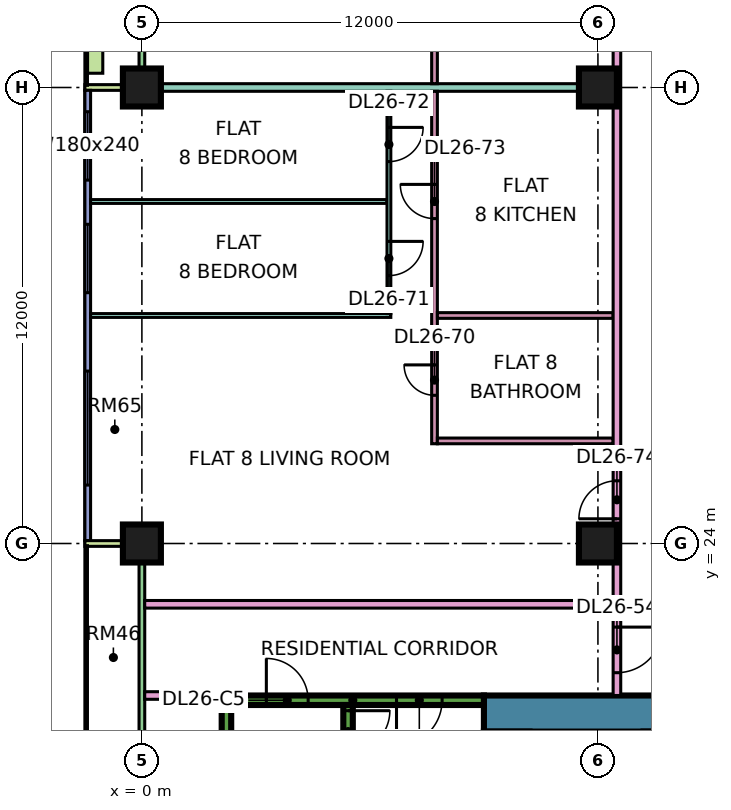
"""IFC4 building model, lengths in metres.
Left out: names, types, materials, properties, quantities, classifications, styles, units other than length and angle.
Written with IfcOpenShell. Run it as: python <this file> out.ifc"""

import sys

from ifc_helpers import new_model, si_unit, direction, frame, frame_2d, origin, origin_2d, place, context, subcontext, project, spatial, rectangle, extrude, element, fill, save


model = new_model("IFC4")
c1 = context("Model", 3, precision=1e-05, world=origin(), true_north=direction((0.0, 1.0)))
c2 = subcontext(c1, "Body", "Model", "MODEL_VIEW")
j1 = project(units=[si_unit("LENGTHUNIT", "METRE"), si_unit("PLANEANGLEUNIT", "RADIAN")], contexts=[c1])
p1 = place(None, origin())
s1 = spatial("IfcSite", under=j1, at=p1, CompositionType="ELEMENT")
p2 = place(p1, origin())
s2 = spatial("IfcBuilding", under=s1, at=p2, CompositionType="ELEMENT")
p3 = place(p2, frame((0.0, 0.0, 114.4)))
s3 = spatial("IfcBuildingStorey", under=s2, at=p3, CompositionType="ELEMENT", Elevation=114.4)
p4 = place(p3, frame((0.0, 24.0, 0.0), z_axis=(0.0, 0.0, 1.0), x_axis=(1.0, 0.0, 0.0)))
e1 = element("IfcColumn", 1, at=p4, inside=s3, PredefinedType="COLUMN", context=c2, shape_type="SweptSolid", body=[
    extrude(rectangle(XDim=1.0, YDim=1.0, at=origin_2d()), origin(), (0.0, 0.0, 1.0), 3.75),
])
p5 = place(p3, frame((0.0, 36.0, 0.0), z_axis=(0.0, 0.0, 1.0), x_axis=(1.0, 0.0, 0.0)))
e2 = element("IfcColumn", 2, at=p5, inside=s3, PredefinedType="COLUMN", context=c2, shape_type="SweptSolid", body=[
    extrude(rectangle(XDim=1.0, YDim=1.0, at=origin_2d()), origin(), (0.0, 0.0, 1.0), 3.75),
])
for number, where, z_axis, x_axis in (
    (3, (12.0, 24.0, 0.0), (0.0, 0.0, 1.0), (1.0, 0.0, 0.0)),
    (4, (12.0, 36.0, 0.0), (0.0, 0.0, 1.0), (1.0, 0.0, 0.0)),
):
    element("IfcColumn", number, at=place(p3, frame(where, z_axis=z_axis, x_axis=x_axis)), inside=s3, PredefinedType="COLUMN", context=c2, shape_type="SweptSolid", body=[
        extrude(rectangle(XDim=1.0, YDim=1.0, at=origin_2d()), origin(), (0.0, 0.0, 1.0), 3.75),
    ])
p6 = place(p3, frame((9.0, 19.525, 0.0), z_axis=(0.0, 0.0, 1.0), x_axis=(1.0, 0.0, 0.0)))
e5 = element("IfcWall", 5, at=p6, inside=s3, PredefinedType="SHEAR", context=c2, shape_type="SweptSolid", body=[
    extrude(rectangle(XDim=25.0, YDim=0.95, at=frame_2d((12.5, 0.0))), origin(), (0.0, 0.0, 1.0), 3.75),
])
p7 = place(p6, frame((19.1, 0.0, 0.0)))
e6 = element("IfcOpeningElement", 6, at=p7, cuts=e5, PredefinedType="OPENING", context=c2, shape_type="SweptSolid", body=[
    extrude(rectangle(XDim=1.8, YDim=2.4, at=frame_2d((0.9, 1.2))), frame((0.0, 0.485, 0.0), z_axis=(0.0, -1.0, 0.0), x_axis=(1.0, 0.0, 0.0)), (0.0, 0.0, 1.0), 0.97),
])
p8 = place(p3, frame((2.1, 19.875, 0.0), z_axis=(0.0, 0.0, 1.0), x_axis=(1.0, 0.0, 0.0)))
e7 = element("IfcWall", 7, at=p8, inside=s3, PredefinedType="SHEAR", context=c2, shape_type="SweptSolid", body=[
    extrude(rectangle(XDim=6.9, YDim=0.25, at=frame_2d((3.45, 0.0))), origin(), (0.0, 0.0, 1.0), 3.75),
])
p9 = place(p8, frame((1.175, 0.0, 0.0)))
e8 = element("IfcOpeningElement", 8, at=p9, cuts=e7, PredefinedType="OPENING", context=c2, shape_type="SweptSolid", body=[
    extrude(rectangle(XDim=1.1, YDim=2.2, at=frame_2d((0.55, 1.1))), frame((0.0, 0.135, 0.0), z_axis=(0.0, -1.0, 0.0), x_axis=(1.0, 0.0, 0.0)), (0.0, 0.0, 1.0), 0.27),
])
p10 = place(p8, frame((4.6, 0.0, 0.0)))
e9 = element("IfcOpeningElement", 9, at=p10, cuts=e7, PredefinedType="OPENING", context=c2, shape_type="SweptSolid", body=[
    extrude(rectangle(XDim=1.2, YDim=2.2, at=frame_2d((0.6, 1.1))), frame((0.0, 0.135, 0.0), z_axis=(0.0, -1.0, 0.0), x_axis=(1.0, 0.0, 0.0)), (0.0, 0.0, 1.0), 0.27),
])
p11 = place(p3, frame((2.225, 13.25, 0.0), z_axis=(0.0, 0.0, 1.0), x_axis=(0.0, 1.0, 0.0)))
e10 = element("IfcWall", 10, at=p11, inside=s3, PredefinedType="SHEAR", context=c2, shape_type="SweptSolid", body=[
    extrude(rectangle(XDim=6.5, YDim=0.25, at=frame_2d((3.25, 0.0))), origin(), (0.0, 0.0, 1.0), 3.75),
])
p12 = place(p3, frame((5.425, 13.25, 0.0), z_axis=(0.0, 0.0, 1.0), x_axis=(0.0, 1.0, 0.0)))
e11 = element("IfcWall", 11, at=p12, inside=s3, PredefinedType="SHEAR", context=c2, shape_type="SweptSolid", body=[
    extrude(rectangle(XDim=6.5, YDim=0.25, at=frame_2d((3.25, 0.0))), origin(), (0.0, 0.0, 1.0), 3.75),
])
p13 = place(p12, frame((5.25, 0.0, 0.0)))
e12 = element("IfcOpeningElement", 12, at=p13, cuts=e11, PredefinedType="OPENING", context=c2, shape_type="SweptSolid", body=[
    extrude(rectangle(XDim=1.1, YDim=2.2, at=frame_2d((0.55, 1.1))), frame((0.0, 0.135, 0.0), z_axis=(0.0, -1.0, 0.0), x_axis=(1.0, 0.0, 0.0)), (0.0, 0.0, 1.0), 0.27),
])
p14 = place(p3, frame((0.0, 47.925, 0.0), z_axis=(0.0, 0.0, 1.0), x_axis=(0.0, -1.0, 0.0)))
e13 = element("IfcWall", 13, at=p14, inside=s3, PredefinedType="SOLIDWALL", context=c2, shape_type="SweptSolid", body=[
    extrude(rectangle(XDim=11.85, YDim=0.15, at=frame_2d((5.925, 0.0))), origin(), (0.0, 0.0, 1.0), 3.35),
])
p15 = place(p14, frame((0.562, 0.0, 0.45)))
e14 = element("IfcOpeningElement", 14, at=p15, cuts=e13, PredefinedType="OPENING", context=c2, shape_type="SweptSolid", body=[
    extrude(rectangle(XDim=1.2, YDim=2.4, at=frame_2d((0.6, 1.2))), frame((0.0, 0.085, 0.0), z_axis=(0.0, -1.0, 0.0), x_axis=(1.0, 0.0, 0.0)), (0.0, 0.0, 1.0), 0.17),
])
p16 = place(p14, frame((4.125, 0.0, 0.0)))
e15 = element("IfcOpeningElement", 15, at=p16, cuts=e13, PredefinedType="OPENING", context=c2, shape_type="SweptSolid", body=[
    extrude(rectangle(XDim=1.2, YDim=2.4, at=frame_2d((0.6, 1.2))), frame((0.0, 0.085, 0.0), z_axis=(0.0, -1.0, 0.0), x_axis=(1.0, 0.0, 0.0)), (0.0, 0.0, 1.0), 0.17),
])
p17 = place(p14, frame((7.125, 0.0, 0.45)))
e16 = element("IfcOpeningElement", 16, at=p17, cuts=e13, PredefinedType="OPENING", context=c2, shape_type="SweptSolid", body=[
    extrude(rectangle(XDim=3.0, YDim=2.4, at=frame_2d((1.5, 1.2))), frame((0.0, 0.085, 0.0), z_axis=(0.0, -1.0, 0.0), x_axis=(1.0, 0.0, 0.0)), (0.0, 0.0, 1.0), 0.17),
])
p18 = place(p3, frame((-1.5, 36.0, 0.0), z_axis=(0.0, 0.0, 1.0), x_axis=(1.0, 0.0, 0.0)))
e17 = element("IfcWall", 17, at=p18, inside=s3, PredefinedType="SOLIDWALL", context=c2, shape_type="SweptSolid", body=[
    extrude(rectangle(XDim=1.5, YDim=0.15, at=frame_2d((0.75, 0.0))), origin(), (0.0, 0.0, 1.0), 3.35),
])
p19 = place(p3, frame((-1.425, 35.925, 0.0), z_axis=(0.0, 0.0, 1.0), x_axis=(0.0, -1.0, 0.0)))
e18 = element("IfcWall", 18, at=p19, inside=s3, PredefinedType="SOLIDWALL", context=c2, shape_type="SweptSolid", body=[
    extrude(rectangle(XDim=11.85, YDim=0.15, at=frame_2d((5.925, 0.0))), origin(), (0.0, 0.0, 1.0), 3.35),
])
p20 = place(p19, frame((0.562, 0.0, 0.45)))
e19 = element("IfcOpeningElement", 19, at=p20, cuts=e18, PredefinedType="OPENING", context=c2, shape_type="SweptSolid", body=[
    extrude(rectangle(XDim=1.8, YDim=2.4, at=frame_2d((0.9, 1.2))), frame((0.0, 0.085, 0.0), z_axis=(0.0, -1.0, 0.0), x_axis=(1.0, 0.0, 0.0)), (0.0, 0.0, 1.0), 0.17),
])
p21 = place(p19, frame((3.525, 0.0, 0.45)))
e20 = element("IfcOpeningElement", 20, at=p21, cuts=e18, PredefinedType="OPENING", context=c2, shape_type="SweptSolid", body=[
    extrude(rectangle(XDim=1.8, YDim=2.4, at=frame_2d((0.9, 1.2))), frame((0.0, 0.085, 0.0), z_axis=(0.0, -1.0, 0.0), x_axis=(1.0, 0.0, 0.0)), (0.0, 0.0, 1.0), 0.17),
])
p22 = place(p19, frame((7.387, 0.0, 0.45)))
e21 = element("IfcOpeningElement", 21, at=p22, cuts=e18, PredefinedType="OPENING", context=c2, shape_type="SweptSolid", body=[
    extrude(rectangle(XDim=3.0, YDim=2.4, at=frame_2d((1.5, 1.2))), frame((0.0, 0.085, 0.0), z_axis=(0.0, -1.0, 0.0), x_axis=(1.0, 0.0, 0.0)), (0.0, 0.0, 1.0), 0.17),
])
p23 = place(p3, frame((0.0, 23.925, 0.0), z_axis=(0.0, 0.0, 1.0), x_axis=(0.0, -1.0, 0.0)))
e22 = element("IfcWall", 22, at=p23, inside=s3, PredefinedType="SOLIDWALL", context=c2, shape_type="SweptSolid", body=[
    extrude(rectangle(XDim=11.35, YDim=0.15, at=frame_2d((5.675, 0.0))), origin(), (0.0, 0.0, 1.0), 3.35),
])
p24 = place(p23, frame((6.738, 0.0, 0.0)))
e23 = element("IfcOpeningElement", 23, at=p24, cuts=e22, PredefinedType="OPENING", context=c2, shape_type="SweptSolid", body=[
    extrude(rectangle(XDim=1.8, YDim=2.4, at=frame_2d((0.9, 1.2))), frame((0.0, 0.085, 0.0), z_axis=(0.0, -1.0, 0.0), x_axis=(1.0, 0.0, 0.0)), (0.0, 0.0, 1.0), 0.17),
])
p25 = place(p3, frame((-1.5, 24.0, 0.0), z_axis=(0.0, 0.0, 1.0), x_axis=(1.0, 0.0, 0.0)))
e24 = element("IfcWall", 24, at=p25, inside=s3, PredefinedType="SOLIDWALL", context=c2, shape_type="SweptSolid", body=[
    extrude(rectangle(XDim=1.5, YDim=0.15, at=frame_2d((0.75, 0.0))), origin(), (0.0, 0.0, 1.0), 3.35),
])
p26 = place(p3, frame((-1.229, 47.625, 0.0), z_axis=(0.0, 0.0, 1.0), x_axis=(0.0, -1.0, 0.0)))
e25 = element("IfcWall", 25, at=p26, inside=s3, PredefinedType="SOLIDWALL", context=c2, shape_type="SweptSolid", body=[
    extrude(rectangle(XDim=11.25, YDim=0.4, at=frame_2d((5.625, 0.0))), origin(), (0.0, 0.0, 1.0), 0.7),
])
p27 = place(p3, frame((-1.351, 33.0, 0.0), z_axis=(0.0, 0.0, 1.0), x_axis=(1.0, 0.0, 0.0)))
e26 = element("IfcWall", 26, at=p27, inside=s3, PredefinedType="PARTITIONING", context=c2, shape_type="SweptSolid", body=[
    extrude(rectangle(XDim=7.801, YDim=0.1, at=frame_2d((3.9, 0.0))), origin(), (0.0, 0.0, 1.0), 3.35),
])
p28 = place(p3, frame((-1.35, 30.0, 0.0), z_axis=(0.0, 0.0, 1.0), x_axis=(1.0, 0.0, 0.0)))
e27 = element("IfcWall", 27, at=p28, inside=s3, PredefinedType="PARTITIONING", context=c2, shape_type="SweptSolid", body=[
    extrude(rectangle(XDim=7.9, YDim=0.1, at=frame_2d((3.95, 0.0))), origin(), (0.0, 0.0, 1.0), 3.35),
])
e28 = element("IfcWall", 28, at=p5, inside=s3, PredefinedType="PARTITIONING", context=c2, shape_type="SweptSolid", body=[
    extrude(rectangle(XDim=12.4, YDim=0.2, at=frame_2d((6.2, 0.0))), origin(), (0.0, 0.0, 1.0), 3.35),
])
p29 = place(p3, frame((0.074, 20.0, 0.0), z_axis=(0.0, 0.0, 1.0), x_axis=(1.0, 0.0, 0.0)))
e29 = element("IfcWall", 29, at=p29, inside=s3, PredefinedType="PARTITIONING", context=c2, shape_type="SweptSolid", body=[
    extrude(rectangle(XDim=2.026, YDim=0.2, at=frame_2d((1.013, 0.0))), origin(), (0.0, 0.0, 1.0), 3.35),
])
p30 = place(p3, frame((0.074, 22.4, 0.0), z_axis=(0.0, 0.0, 1.0), x_axis=(1.0, 0.0, 0.0)))
e30 = element("IfcWall", 30, at=p30, inside=s3, PredefinedType="PARTITIONING", context=c2, shape_type="SweptSolid", body=[
    extrude(rectangle(XDim=12.326, YDim=0.2, at=frame_2d((6.163, 0.0))), origin(), (0.0, 0.0, 1.0), 3.35),
])
p31 = place(p3, frame((6.5, 30.05, 0.0), z_axis=(0.0, 0.0, 1.0), x_axis=(0.0, 1.0, 0.0)))
e31 = element("IfcWall", 31, at=p31, inside=s3, PredefinedType="PARTITIONING", context=c2, shape_type="SweptSolid", body=[
    extrude(rectangle(XDim=5.85, YDim=0.1, at=frame_2d((2.925, 0.0))), origin(), (0.0, 0.0, 1.0), 3.35),
])
p32 = place(p31, frame((1.0, 0.0, 0.0)))
e32 = element("IfcOpeningElement", 32, at=p32, cuts=e31, PredefinedType="OPENING", context=c2, shape_type="SweptSolid", body=[
    extrude(rectangle(XDim=0.9, YDim=2.1, at=frame_2d((0.45, 1.05))), frame((0.0, 0.06, 0.0), z_axis=(0.0, -1.0, 0.0), x_axis=(1.0, 0.0, 0.0)), (0.0, 0.0, 1.0), 0.12),
])
p33 = place(p31, frame((4.0, 0.0, 0.0)))
e33 = element("IfcOpeningElement", 33, at=p33, cuts=e31, PredefinedType="OPENING", context=c2, shape_type="SweptSolid", body=[
    extrude(rectangle(XDim=0.9, YDim=2.1, at=frame_2d((0.45, 1.05))), frame((0.0, 0.06, 0.0), z_axis=(0.0, -1.0, 0.0), x_axis=(1.0, 0.0, 0.0)), (0.0, 0.0, 1.0), 0.12),
])
p34 = place(p3, frame((7.7, 26.625, 0.0), z_axis=(0.0, 0.0, 1.0), x_axis=(0.0, 1.0, 0.0)))
e34 = element("IfcWall", 34, at=p34, inside=s3, PredefinedType="PARTITIONING", context=c2, shape_type="SweptSolid", body=[
    extrude(rectangle(XDim=9.275, YDim=0.15, at=frame_2d((4.637, 0.0))), origin(), (0.0, 0.0, 1.0), 3.35),
])
p35 = place(p34, frame((1.275, 0.0, 0.0)))
e35 = element("IfcOpeningElement", 35, at=p35, cuts=e34, PredefinedType="OPENING", context=c2, shape_type="SweptSolid", body=[
    extrude(rectangle(XDim=0.8, YDim=2.1, at=frame_2d((0.4, 1.05))), frame((0.0, 0.085, 0.0), z_axis=(0.0, -1.0, 0.0), x_axis=(1.0, 0.0, 0.0)), (0.0, 0.0, 1.0), 0.17),
])
p36 = place(p34, frame((5.925, 0.0, 0.0)))
e36 = element("IfcOpeningElement", 36, at=p36, cuts=e34, PredefinedType="OPENING", context=c2, shape_type="SweptSolid", body=[
    extrude(rectangle(XDim=0.9, YDim=2.1, at=frame_2d((0.45, 1.05))), frame((0.0, 0.085, 0.0), z_axis=(0.0, -1.0, 0.0), x_axis=(1.0, 0.0, 0.0)), (0.0, 0.0, 1.0), 0.17),
])
p37 = place(p3, frame((7.7, 36.1, 0.0), z_axis=(0.0, 0.0, 1.0), x_axis=(0.0, 1.0, 0.0)))
e37 = element("IfcWall", 37, at=p37, inside=s3, PredefinedType="PARTITIONING", context=c2, shape_type="SweptSolid", body=[
    extrude(rectangle(XDim=11.375, YDim=0.15, at=frame_2d((5.688, 0.0))), origin(), (0.0, 0.0, 1.0), 3.35),
])
p38 = place(p37, frame((9.65, 0.0, 0.0)))
e38 = element("IfcOpeningElement", 38, at=p38, cuts=e37, PredefinedType="OPENING", context=c2, shape_type="SweptSolid", body=[
    extrude(rectangle(XDim=0.8, YDim=2.1, at=frame_2d((0.4, 1.05))), frame((0.0, 0.085, 0.0), z_axis=(0.0, -1.0, 0.0), x_axis=(1.0, 0.0, 0.0)), (0.0, 0.0, 1.0), 0.17),
])
p39 = place(p37, frame((2.3, 0.0, 0.0)))
e39 = element("IfcOpeningElement", 39, at=p39, cuts=e37, PredefinedType="OPENING", context=c2, shape_type="SweptSolid", body=[
    extrude(rectangle(XDim=0.9, YDim=2.1, at=frame_2d((0.45, 1.05))), frame((0.0, 0.085, 0.0), z_axis=(0.0, -1.0, 0.0), x_axis=(1.0, 0.0, 0.0)), (0.0, 0.0, 1.0), 0.17),
])
p40 = place(p37, frame((6.8, 0.0, 0.0)))
e40 = element("IfcOpeningElement", 40, at=p40, cuts=e37, PredefinedType="OPENING", context=c2, shape_type="SweptSolid", body=[
    extrude(rectangle(XDim=0.8, YDim=2.1, at=frame_2d((0.4, 1.05))), frame((0.0, 0.085, 0.0), z_axis=(0.0, -1.0, 0.0), x_axis=(1.0, 0.0, 0.0)), (0.0, 0.0, 1.0), 0.17),
])
for number, where, z_axis, x_axis in (
    (41, (7.775, 26.7, 0.0), (0.0, 0.0, 1.0), (1.0, 0.0, 0.0)),
    (42, (7.775, 30.0, 0.0), (0.0, 0.0, 1.0), (1.0, 0.0, 0.0)),
):
    element("IfcWall", number, at=place(p3, frame(where, z_axis=z_axis, x_axis=x_axis)), inside=s3, PredefinedType="PARTITIONING", context=c2, shape_type="SweptSolid", body=[
        extrude(rectangle(XDim=4.625, YDim=0.15, at=frame_2d((2.312, 0.0))), origin(), (0.0, 0.0, 1.0), 3.35),
    ])
p41 = place(p3, frame((12.5, 20.0, 0.0), z_axis=(0.0, 0.0, 1.0), x_axis=(0.0, 1.0, 0.0)))
e43 = element("IfcWall", 43, at=p41, inside=s3, PredefinedType="PARTITIONING", context=c2, shape_type="SweptSolid", body=[
    extrude(rectangle(XDim=42.926, YDim=0.2, at=frame_2d((21.463, 0.0))), origin(), (0.0, 0.0, 1.0), 3.35),
])
p42 = place(p41, frame((28.65, 0.0, 0.0)))
e44 = element("IfcOpeningElement", 44, at=p42, cuts=e43, PredefinedType="OPENING", context=c2, shape_type="SweptSolid", body=[
    extrude(rectangle(XDim=1.0, YDim=2.1, at=frame_2d((0.5, 1.05))), frame((0.0, 0.11, 0.0), z_axis=(0.0, -1.0, 0.0), x_axis=(1.0, 0.0, 0.0)), (0.0, 0.0, 1.0), 0.22),
])
p43 = place(p41, frame((31.95, 0.0, 0.0)))
e45 = element("IfcOpeningElement", 45, at=p43, cuts=e43, PredefinedType="OPENING", context=c2, shape_type="SweptSolid", body=[
    extrude(rectangle(XDim=1.0, YDim=2.1, at=frame_2d((0.5, 1.05))), frame((0.0, 0.11, 0.0), z_axis=(0.0, -1.0, 0.0), x_axis=(1.0, 0.0, 0.0)), (0.0, 0.0, 1.0), 0.22),
])
p44 = place(p41, frame((0.6, 0.0, 0.0)))
e46 = element("IfcOpeningElement", 46, at=p44, cuts=e43, PredefinedType="OPENING", context=c2, shape_type="SweptSolid", body=[
    extrude(rectangle(XDim=1.2, YDim=2.1, at=frame_2d((0.6, 1.05))), frame((0.0, 0.11, 0.0), z_axis=(0.0, -1.0, 0.0), x_axis=(1.0, 0.0, 0.0)), (0.0, 0.0, 1.0), 0.22),
])
p45 = place(p41, frame((4.65, 0.0, 0.0)))
e47 = element("IfcOpeningElement", 47, at=p45, cuts=e43, PredefinedType="OPENING", context=c2, shape_type="SweptSolid", body=[
    extrude(rectangle(XDim=1.0, YDim=2.1, at=frame_2d((0.5, 1.05))), frame((0.0, 0.11, 0.0), z_axis=(0.0, -1.0, 0.0), x_axis=(1.0, 0.0, 0.0)), (0.0, 0.0, 1.0), 0.22),
])
p46 = place(p20, origin())
e48 = element("IfcWindow", 48, at=p46, inside=s3, PartitioningType="SINGLE_PANEL", PredefinedType="WINDOW", context=c2, shape_type="SweptSolid", body=[
    extrude(rectangle(XDim=1.8, YDim=2.4, at=frame_2d((0.9, 1.2))), frame((0.0, 0.03, 0.0), z_axis=(0.0, -1.0, 0.0), x_axis=(1.0, 0.0, 0.0)), (0.0, 0.0, 1.0), 0.06),
])
fill(e19, e48)
p47 = place(p21, origin())
e49 = element("IfcWindow", 49, at=p47, inside=s3, PartitioningType="SINGLE_PANEL", PredefinedType="WINDOW", context=c2, shape_type="SweptSolid", body=[
    extrude(rectangle(XDim=1.8, YDim=2.4, at=frame_2d((0.9, 1.2))), frame((0.0, 0.03, 0.0), z_axis=(0.0, -1.0, 0.0), x_axis=(1.0, 0.0, 0.0)), (0.0, 0.0, 1.0), 0.06),
])
fill(e20, e49)
p48 = place(p22, origin())
e50 = element("IfcWindow", 50, at=p48, inside=s3, PartitioningType="SINGLE_PANEL", PredefinedType="WINDOW", context=c2, shape_type="SweptSolid", body=[
    extrude(rectangle(XDim=3.0, YDim=2.4, at=frame_2d((1.5, 1.2))), frame((0.0, 0.03, 0.0), z_axis=(0.0, -1.0, 0.0), x_axis=(1.0, 0.0, 0.0)), (0.0, 0.0, 1.0), 0.06),
])
fill(e21, e50)
p49 = place(p13, origin())
e51 = element("IfcDoor", 51, at=p49, inside=s3, OperationType="SINGLE_SWING_RIGHT", PredefinedType="DOOR", context=c2, shape_type="SweptSolid", body=[
    extrude(rectangle(XDim=1.1, YDim=2.2, at=frame_2d((0.55, 1.1))), frame((0.0, 0.025, 0.0), z_axis=(0.0, -1.0, 0.0), x_axis=(1.0, 0.0, 0.0)), (0.0, 0.0, 1.0), 0.05),
])
fill(e12, e51)
p50 = place(p9, origin())
e52 = element("IfcDoor", 52, at=p50, inside=s3, OperationType="SINGLE_SWING_LEFT", PredefinedType="DOOR", context=c2, shape_type="SweptSolid", body=[
    extrude(rectangle(XDim=1.1, YDim=2.2, at=frame_2d((0.55, 1.1))), frame((0.0, 0.025, 0.0), z_axis=(0.0, -1.0, 0.0), x_axis=(1.0, 0.0, 0.0)), (0.0, 0.0, 1.0), 0.05),
])
fill(e8, e52)
p51 = place(p10, frame((1.2, 0.0, 0.0), z_axis=(0.0, 0.0, 1.0), x_axis=(-1.0, 0.0, 0.0)))
e53 = element("IfcDoor", 53, at=p51, inside=s3, OperationType="SINGLE_SWING_LEFT", PredefinedType="DOOR", context=c2, shape_type="SweptSolid", body=[
    extrude(rectangle(XDim=1.2, YDim=2.2, at=frame_2d((0.6, 1.1))), frame((0.0, 0.025, 0.0), z_axis=(0.0, -1.0, 0.0), x_axis=(1.0, 0.0, 0.0)), (0.0, 0.0, 1.0), 0.05),
])
fill(e9, e53)
p52 = place(p44, origin())
e54 = element("IfcDoor", 54, at=p52, inside=s3, OperationType="SINGLE_SWING_RIGHT", PredefinedType="DOOR", context=c2, shape_type="SweptSolid", body=[
    extrude(rectangle(XDim=1.2, YDim=2.1, at=frame_2d((0.6, 1.05))), frame((0.0, 0.025, 0.0), z_axis=(0.0, -1.0, 0.0), x_axis=(1.0, 0.0, 0.0)), (0.0, 0.0, 1.0), 0.05),
])
fill(e46, e54)
p53 = place(p35, frame((0.8, 0.0, 0.0), z_axis=(0.0, 0.0, 1.0), x_axis=(-1.0, 0.0, 0.0)))
e55 = element("IfcDoor", 55, at=p53, inside=s3, OperationType="SINGLE_SWING_RIGHT", PredefinedType="DOOR", context=c2, shape_type="SweptSolid", body=[
    extrude(rectangle(XDim=0.8, YDim=2.1, at=frame_2d((0.4, 1.05))), frame((0.0, 0.025, 0.0), z_axis=(0.0, -1.0, 0.0), x_axis=(1.0, 0.0, 0.0)), (0.0, 0.0, 1.0), 0.05),
])
fill(e35, e55)
p54 = place(p32, origin())
e56 = element("IfcDoor", 56, at=p54, inside=s3, OperationType="SINGLE_SWING_RIGHT", PredefinedType="DOOR", context=c2, shape_type="SweptSolid", body=[
    extrude(rectangle(XDim=0.9, YDim=2.1, at=frame_2d((0.45, 1.05))), frame((0.0, 0.025, 0.0), z_axis=(0.0, -1.0, 0.0), x_axis=(1.0, 0.0, 0.0)), (0.0, 0.0, 1.0), 0.05),
])
fill(e32, e56)
p55 = place(p33, origin())
e57 = element("IfcDoor", 57, at=p55, inside=s3, OperationType="SINGLE_SWING_RIGHT", PredefinedType="DOOR", context=c2, shape_type="SweptSolid", body=[
    extrude(rectangle(XDim=0.9, YDim=2.1, at=frame_2d((0.45, 1.05))), frame((0.0, 0.025, 0.0), z_axis=(0.0, -1.0, 0.0), x_axis=(1.0, 0.0, 0.0)), (0.0, 0.0, 1.0), 0.05),
])
fill(e33, e57)
p56 = place(p36, frame((0.9, 0.0, 0.0), z_axis=(0.0, 0.0, 1.0), x_axis=(-1.0, 0.0, 0.0)))
e58 = element("IfcDoor", 58, at=p56, inside=s3, OperationType="SINGLE_SWING_RIGHT", PredefinedType="DOOR", context=c2, shape_type="SweptSolid", body=[
    extrude(rectangle(XDim=0.9, YDim=2.1, at=frame_2d((0.45, 1.05))), frame((0.0, 0.025, 0.0), z_axis=(0.0, -1.0, 0.0), x_axis=(1.0, 0.0, 0.0)), (0.0, 0.0, 1.0), 0.05),
])
fill(e36, e58)
p57 = place(p45, origin())
e59 = element("IfcDoor", 59, at=p57, inside=s3, OperationType="SINGLE_SWING_LEFT", PredefinedType="DOOR", context=c2, shape_type="SweptSolid", body=[
    extrude(rectangle(XDim=1.0, YDim=2.1, at=frame_2d((0.5, 1.05))), frame((0.0, 0.025, 0.0), z_axis=(0.0, -1.0, 0.0), x_axis=(1.0, 0.0, 0.0)), (0.0, 0.0, 1.0), 0.05),
])
fill(e47, e59)
save(model, sys.argv[1])
